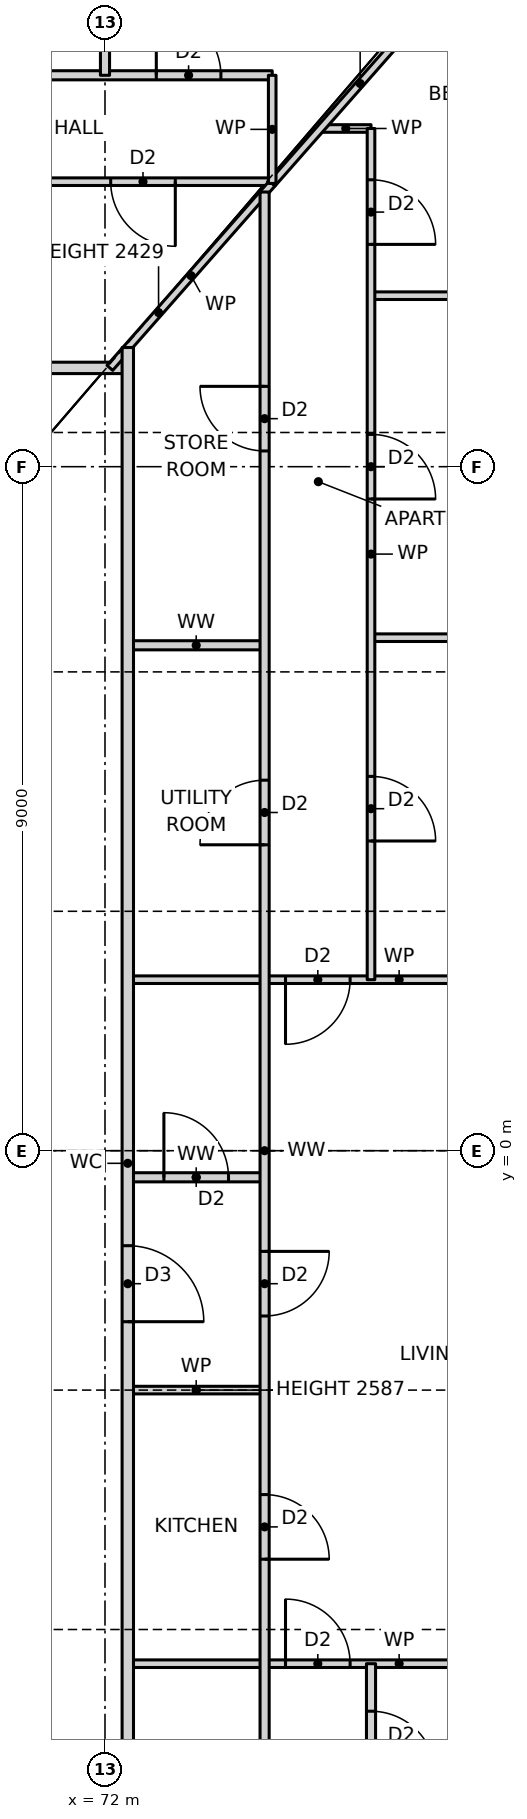
"""IFC4 building model, lengths in metres.
Left out: names, types, materials, properties, quantities, classifications, styles, units other than length and angle.
Written with IfcOpenShell. Run it as: python <this file> out.ifc"""

import sys

from ifc_helpers import new_model, si_unit, direction, frame, frame_2d, origin, place, context, subcontext, project, spatial, rectangle, extrude, element, fill, save


model = new_model("IFC4")
c1 = context("Model", 3, precision=1e-05, world=origin(), true_north=direction((0.0, 1.0)))
c2 = subcontext(c1, "Body", "Model", "MODEL_VIEW")
j1 = project(units=[si_unit("LENGTHUNIT", "METRE"), si_unit("PLANEANGLEUNIT", "RADIAN")], contexts=[c1])
p1 = place(None, origin())
s1 = spatial("IfcSite", under=j1, at=p1, CompositionType="ELEMENT")
p2 = place(p1, origin())
s2 = spatial("IfcBuilding", under=s1, at=p2, CompositionType="ELEMENT")
p3 = place(p2, frame((0.0, 0.0, 22.0)))
s3 = spatial("IfcBuildingStorey", under=s2, at=p3, CompositionType="ELEMENT", Elevation=22.0)
p4 = place(p3, frame((72.3, -6.75, 0.0), z_axis=(0.0, 0.0, 1.0), x_axis=(1.0, 0.0, 0.0)))
e1 = element("IfcWall", 1, at=p4, inside=s3, PredefinedType="PARTITIONING", context=c2, shape_type="SweptSolid", body=[
    extrude(rectangle(XDim=7.14, YDim=0.1, at=frame_2d((3.57, 0.0))), origin(), (0.0, 0.0, 1.0), 3.27),
])
p5 = place(p4, frame((2.075, 0.0, 0.0)))
e2 = element("IfcOpeningElement", 2, at=p5, cuts=e1, PredefinedType="OPENING", context=c2, shape_type="SweptSolid", body=[
    extrude(rectangle(XDim=0.85, YDim=2.1, at=frame_2d((0.425, 1.05))), frame((0.0, 0.06, 0.0), z_axis=(0.0, -1.0, 0.0), x_axis=(1.0, 0.0, 0.0)), (0.0, 0.0, 1.0), 0.12),
])
p6 = place(p3, frame((72.3, -3.15, 0.0), z_axis=(0.0, 0.0, 1.0), x_axis=(1.0, 0.0, 0.0)))
e3 = element("IfcWall", 3, at=p6, inside=s3, PredefinedType="PARTITIONING", context=c2, shape_type="SweptSolid", body=[
    extrude(rectangle(XDim=1.8, YDim=0.1, at=frame_2d((0.9, 0.0))), origin(), (0.0, 0.0, 1.0), 2.587),
])
p7 = place(p3, frame((72.3, -0.35, 0.0), z_axis=(0.0, 0.0, 1.0), x_axis=(1.0, 0.0, 0.0)))
e4 = element("IfcWall", 4, at=p7, inside=s3, PredefinedType="PARTITIONING", context=c2, shape_type="SweptSolid", body=[
    extrude(rectangle(XDim=1.8, YDim=0.12, at=frame_2d((0.9, 0.0))), origin(), (0.0, 0.0, 1.0), 3.27),
])
p8 = place(p7, frame((0.475, 0.0, 0.0)))
e5 = element("IfcOpeningElement", 5, at=p8, cuts=e4, PredefinedType="OPENING", context=c2, shape_type="SweptSolid", body=[
    extrude(rectangle(XDim=0.85, YDim=2.1, at=frame_2d((0.425, 1.05))), frame((0.0, 0.07, 0.0), z_axis=(0.0, -1.0, 0.0), x_axis=(1.0, 0.0, 0.0)), (0.0, 0.0, 1.0), 0.14),
])
p9 = place(p3, frame((72.3, 2.25, 0.0), z_axis=(0.0, 0.0, 1.0), x_axis=(1.0, 0.0, 0.0)))
e6 = element("IfcWall", 6, at=p9, inside=s3, PredefinedType="PARTITIONING", context=c2, shape_type="SweptSolid", body=[
    extrude(rectangle(XDim=7.14, YDim=0.1, at=frame_2d((3.57, 0.0))), origin(), (0.0, 0.0, 1.0), 3.27),
])
p10 = place(p9, frame((2.075, 0.0, 0.0)))
e7 = element("IfcOpeningElement", 7, at=p10, cuts=e6, PredefinedType="OPENING", context=c2, shape_type="SweptSolid", body=[
    extrude(rectangle(XDim=0.85, YDim=2.1, at=frame_2d((0.425, 1.05))), frame((0.0, 0.06, 0.0), z_axis=(0.0, -1.0, 0.0), x_axis=(1.0, 0.0, 0.0)), (0.0, 0.0, 1.0), 0.12),
])
p11 = place(p3, frame((72.3, 6.65, 0.0), z_axis=(0.0, 0.0, 1.0), x_axis=(1.0, 0.0, 0.0)))
e8 = element("IfcWall", 8, at=p11, inside=s3, PredefinedType="PARTITIONING", context=c2, shape_type="SweptSolid", body=[
    extrude(rectangle(XDim=1.8, YDim=0.12, at=frame_2d((0.9, 0.0))), origin(), (0.0, 0.0, 1.0), 3.27),
])
p12 = place(p3, frame((75.5, 6.75, 0.0), z_axis=(0.0, 0.0, 1.0), x_axis=(1.0, 0.0, 0.0)))
e9 = element("IfcWall", 9, at=p12, inside=s3, PredefinedType="PARTITIONING", context=c2, shape_type="SweptSolid", body=[
    extrude(rectangle(XDim=3.94, YDim=0.1, at=frame_2d((1.97, 0.0))), origin(), (0.0, 0.0, 1.0), 3.27),
])
p13 = place(p3, frame((53.7, 10.3, 0.0), z_axis=(0.0, 0.0, 1.0), x_axis=(1.0, 0.0, 0.0)))
e10 = element("IfcWall", 10, at=p13, inside=s3, PredefinedType="PARTITIONING", context=c2, shape_type="SweptSolid", body=[
    extrude(rectangle(XDim=18.6, YDim=0.15, at=frame_2d((9.3, 0.0))), origin(), (0.0, 0.0, 1.0), 3.27),
])
p14 = place(p13, frame((8.3, 0.0, 0.0)))
e11 = element("IfcOpeningElement", 11, at=p14, cuts=e10, PredefinedType="OPENING", context=c2, shape_type="SweptSolid", body=[
    extrude(rectangle(XDim=1.0, YDim=2.1, at=frame_2d((0.5, 1.05))), frame((0.0, 0.085, 0.0), z_axis=(0.0, -1.0, 0.0), x_axis=(1.0, 0.0, 0.0)), (0.0, 0.0, 1.0), 0.17),
])
p15 = place(p3, frame((75.5, 11.25, 0.0), z_axis=(0.0, 0.0, 1.0), x_axis=(1.0, 0.0, 0.0)))
e12 = element("IfcWall", 12, at=p15, inside=s3, PredefinedType="PARTITIONING", context=c2, shape_type="SweptSolid", body=[
    extrude(rectangle(XDim=3.94, YDim=0.1, at=frame_2d((1.97, 0.0))), origin(), (0.0, 0.0, 1.0), 3.27),
])
p16 = place(p3, frame((51.8, 12.75, 0.0), z_axis=(0.0, 0.0, 1.0), x_axis=(1.0, 0.0, 0.0)))
e13 = element("IfcWall", 13, at=p16, inside=s3, PredefinedType="PARTITIONING", context=c2, shape_type="SweptSolid", body=[
    extrude(rectangle(XDim=22.4, YDim=0.1, at=frame_2d((11.2, 0.0))), origin(), (0.0, 0.0, 1.0), 3.27),
])
p17 = place(p16, frame((13.475, 0.0, 0.0)))
e14 = element("IfcOpeningElement", 14, at=p17, cuts=e13, PredefinedType="OPENING", context=c2, shape_type="SweptSolid", body=[
    extrude(rectangle(XDim=0.85, YDim=2.1, at=frame_2d((0.425, 1.05))), frame((0.0, 0.06, 0.0), z_axis=(0.0, -1.0, 0.0), x_axis=(1.0, 0.0, 0.0)), (0.0, 0.0, 1.0), 0.12),
])
p18 = place(p16, frame((10.275, 0.0, 0.0)))
e15 = element("IfcOpeningElement", 15, at=p18, cuts=e13, PredefinedType="OPENING", context=c2, shape_type="SweptSolid", body=[
    extrude(rectangle(XDim=0.85, YDim=2.1, at=frame_2d((0.425, 1.05))), frame((0.0, 0.06, 0.0), z_axis=(0.0, -1.0, 0.0), x_axis=(1.0, 0.0, 0.0)), (0.0, 0.0, 1.0), 0.12),
])
p19 = place(p16, frame((16.925, 0.0, 0.0)))
e16 = element("IfcOpeningElement", 16, at=p19, cuts=e13, PredefinedType="OPENING", context=c2, shape_type="SweptSolid", body=[
    extrude(rectangle(XDim=0.85, YDim=2.1, at=frame_2d((0.425, 1.05))), frame((0.0, 0.06, 0.0), z_axis=(0.0, -1.0, 0.0), x_axis=(1.0, 0.0, 0.0)), (0.0, 0.0, 1.0), 0.12),
])
p20 = place(p16, frame((20.275, 0.0, 0.0)))
e17 = element("IfcOpeningElement", 17, at=p20, cuts=e13, PredefinedType="OPENING", context=c2, shape_type="SweptSolid", body=[
    extrude(rectangle(XDim=0.85, YDim=2.1, at=frame_2d((0.425, 1.05))), frame((0.0, 0.06, 0.0), z_axis=(0.0, -1.0, 0.0), x_axis=(1.0, 0.0, 0.0)), (0.0, 0.0, 1.0), 0.12),
])
p21 = place(p16, frame((4.625, 0.0, 0.0)))
e18 = element("IfcOpeningElement", 18, at=p21, cuts=e13, PredefinedType="OPENING", context=c2, shape_type="SweptSolid", body=[
    extrude(rectangle(XDim=0.85, YDim=2.1, at=frame_2d((0.425, 1.05))), frame((0.0, 0.06, 0.0), z_axis=(0.0, -1.0, 0.0), x_axis=(1.0, 0.0, 0.0)), (0.0, 0.0, 1.0), 0.12),
])
p22 = place(p16, frame((1.275, 0.0, 0.0)))
e19 = element("IfcOpeningElement", 19, at=p22, cuts=e13, PredefinedType="OPENING", context=c2, shape_type="SweptSolid", body=[
    extrude(rectangle(XDim=0.85, YDim=2.1, at=frame_2d((0.425, 1.05))), frame((0.0, 0.06, 0.0), z_axis=(0.0, -1.0, 0.0), x_axis=(1.0, 0.0, 0.0)), (0.0, 0.0, 1.0), 0.12),
])
p23 = place(p3, frame((74.836, 13.45, 0.0), z_axis=(0.0, 0.0, 1.0), x_axis=(1.0, 0.0, 0.0)))
e20 = element("IfcWall", 20, at=p23, inside=s3, PredefinedType="PARTITIONING", context=c2, shape_type="SweptSolid", body=[
    extrude(rectangle(XDim=0.664, YDim=0.1, at=frame_2d((0.332, 0.0))), origin(), (0.0, 0.0, 1.0), 3.27),
])
p24 = place(p3, frame((67.5, 14.15, 0.0), z_axis=(0.0, 0.0, 1.0), x_axis=(1.0, 0.0, 0.0)))
e21 = element("IfcWall", 21, at=p24, inside=s3, PredefinedType="PARTITIONING", context=c2, shape_type="SweptSolid", body=[
    extrude(rectangle(XDim=6.7, YDim=0.12, at=frame_2d((3.35, 0.0))), origin(), (0.0, 0.0, 1.0), 3.27),
])
p25 = place(p24, frame((0.625, 0.0, 0.0)))
e22 = element("IfcOpeningElement", 22, at=p25, cuts=e21, PredefinedType="OPENING", context=c2, shape_type="SweptSolid", body=[
    extrude(rectangle(XDim=0.85, YDim=2.1, at=frame_2d((0.425, 1.05))), frame((0.0, 0.07, 0.0), z_axis=(0.0, -1.0, 0.0), x_axis=(1.0, 0.0, 0.0)), (0.0, 0.0, 1.0), 0.14),
])
p26 = place(p24, frame((5.175, 0.0, 0.0)))
e23 = element("IfcOpeningElement", 23, at=p26, cuts=e21, PredefinedType="OPENING", context=c2, shape_type="SweptSolid", body=[
    extrude(rectangle(XDim=0.85, YDim=2.1, at=frame_2d((0.425, 1.05))), frame((0.0, 0.07, 0.0), z_axis=(0.0, -1.0, 0.0), x_axis=(1.0, 0.0, 0.0)), (0.0, 0.0, 1.0), 0.14),
])
p27 = place(p3, frame((72.064, 10.3, 0.0), z_axis=(0.0, 0.0, 1.0), x_axis=(0.660667046586, 0.75067906162, 0.0)))
e24 = element("IfcWall", 24, at=p27, inside=s3, PredefinedType="PARTITIONING", context=c2, shape_type="SweptSolid", body=[
    extrude(rectangle(XDim=3.233, YDim=0.1, at=frame_2d((1.617, 0.0))), origin(), (0.0, 0.0, 1.0), 2.429),
])
p28 = place(p3, frame((74.2, 12.727, 0.0), z_axis=(0.0, 0.0, 1.0), x_axis=(0.660698595885, 0.750651294141, 0.0)))
e25 = element("IfcWall", 25, at=p28, inside=s3, PredefinedType="PARTITIONING", context=c2, shape_type="SweptSolid", body=[
    extrude(rectangle(XDim=5.838, YDim=0.1, at=frame_2d((2.919, 0.0))), origin(), (0.0, 0.0, 1.0), 2.429),
])
p29 = place(p3, frame((75.5, -13.45, 0.0), z_axis=(0.0, 0.0, 1.0), x_axis=(0.0, 1.0, 0.0)))
e26 = element("IfcWall", 26, at=p29, inside=s3, PredefinedType="PARTITIONING", context=c2, shape_type="SweptSolid", body=[
    extrude(rectangle(XDim=6.7, YDim=0.12, at=frame_2d((3.35, 0.0))), origin(), (0.0, 0.0, 1.0), 3.27),
])
p30 = place(p29, frame((5.225, 0.0, 0.0)))
e27 = element("IfcOpeningElement", 27, at=p30, cuts=e26, PredefinedType="OPENING", context=c2, shape_type="SweptSolid", body=[
    extrude(rectangle(XDim=0.85, YDim=2.1, at=frame_2d((0.425, 1.05))), frame((0.0, 0.07, 0.0), z_axis=(0.0, -1.0, 0.0), x_axis=(1.0, 0.0, 0.0)), (0.0, 0.0, 1.0), 0.14),
])
p31 = place(p29, frame((0.675, 0.0, 0.0)))
e28 = element("IfcOpeningElement", 28, at=p31, cuts=e26, PredefinedType="OPENING", context=c2, shape_type="SweptSolid", body=[
    extrude(rectangle(XDim=0.85, YDim=2.1, at=frame_2d((0.425, 1.05))), frame((0.0, 0.07, 0.0), z_axis=(0.0, -1.0, 0.0), x_axis=(1.0, 0.0, 0.0)), (0.0, 0.0, 1.0), 0.14),
])
p32 = place(p3, frame((75.5, 2.25, 0.0), z_axis=(0.0, 0.0, 1.0), x_axis=(0.0, 1.0, 0.0)))
e29 = element("IfcWall", 29, at=p32, inside=s3, PredefinedType="PARTITIONING", context=c2, shape_type="SweptSolid", body=[
    extrude(rectangle(XDim=11.2, YDim=0.1, at=frame_2d((5.6, 0.0))), origin(), (0.0, 0.0, 1.0), 3.27),
])
p33 = place(p32, frame((1.825, 0.0, 0.0)))
e30 = element("IfcOpeningElement", 30, at=p33, cuts=e29, PredefinedType="OPENING", context=c2, shape_type="SweptSolid", body=[
    extrude(rectangle(XDim=0.85, YDim=2.1, at=frame_2d((0.425, 1.05))), frame((0.0, 0.06, 0.0), z_axis=(0.0, -1.0, 0.0), x_axis=(1.0, 0.0, 0.0)), (0.0, 0.0, 1.0), 0.12),
])
p34 = place(p32, frame((6.325, 0.0, 0.0)))
e31 = element("IfcOpeningElement", 31, at=p34, cuts=e29, PredefinedType="OPENING", context=c2, shape_type="SweptSolid", body=[
    extrude(rectangle(XDim=0.85, YDim=2.1, at=frame_2d((0.425, 1.05))), frame((0.0, 0.06, 0.0), z_axis=(0.0, -1.0, 0.0), x_axis=(1.0, 0.0, 0.0)), (0.0, 0.0, 1.0), 0.12),
])
p35 = place(p32, frame((9.675, 0.0, 0.0)))
e32 = element("IfcOpeningElement", 32, at=p35, cuts=e29, PredefinedType="OPENING", context=c2, shape_type="SweptSolid", body=[
    extrude(rectangle(XDim=0.85, YDim=2.1, at=frame_2d((0.425, 1.05))), frame((0.0, 0.06, 0.0), z_axis=(0.0, -1.0, 0.0), x_axis=(1.0, 0.0, 0.0)), (0.0, 0.0, 1.0), 0.12),
])
p36 = place(p3, frame((74.2, 12.727, 0.0), z_axis=(0.0, 0.0, 1.0), x_axis=(0.0, 1.0, 0.0)))
e33 = element("IfcWall", 33, at=p36, inside=s3, PredefinedType="PARTITIONING", context=c2, shape_type="SweptSolid", body=[
    extrude(rectangle(XDim=1.423, YDim=0.1, at=frame_2d((0.711, 0.0))), origin(), (0.0, 0.0, 1.0), 3.27),
])
p37 = place(p3, frame((74.1, -12.614, 0.0), z_axis=(0.0, 0.0, 1.0), x_axis=(0.0, 1.0, 0.0)))
e34 = element("IfcWall", 34, at=p37, inside=s3, PredefinedType="PARTITIONING", context=c2, shape_type="SweptSolid", body=[
    extrude(rectangle(XDim=25.228, YDim=0.12, at=frame_2d((12.614, 0.0))), origin(), (0.0, 0.0, 1.0), 3.27),
])
p38 = place(p37, frame((7.239, 0.0, 0.0)))
e35 = element("IfcOpeningElement", 35, at=p38, cuts=e34, PredefinedType="OPENING", context=c2, shape_type="SweptSolid", body=[
    extrude(rectangle(XDim=0.85, YDim=2.1, at=frame_2d((0.425, 1.05))), frame((0.0, 0.07, 0.0), z_axis=(0.0, -1.0, 0.0), x_axis=(1.0, 0.0, 0.0)), (0.0, 0.0, 1.0), 0.14),
])
p39 = place(p37, frame((10.439, 0.0, 0.0)))
e36 = element("IfcOpeningElement", 36, at=p39, cuts=e34, PredefinedType="OPENING", context=c2, shape_type="SweptSolid", body=[
    extrude(rectangle(XDim=0.85, YDim=2.1, at=frame_2d((0.425, 1.05))), frame((0.0, 0.07, 0.0), z_axis=(0.0, -1.0, 0.0), x_axis=(1.0, 0.0, 0.0)), (0.0, 0.0, 1.0), 0.14),
])
p40 = place(p37, frame((2.507, 0.0, 0.0)))
e37 = element("IfcOpeningElement", 37, at=p40, cuts=e34, PredefinedType="OPENING", context=c2, shape_type="SweptSolid", body=[
    extrude(rectangle(XDim=0.85, YDim=2.1, at=frame_2d((0.425, 1.05))), frame((0.0, 0.07, 0.0), z_axis=(0.0, -1.0, 0.0), x_axis=(1.0, 0.0, 0.0)), (0.0, 0.0, 1.0), 0.14),
])
p41 = place(p37, frame((16.639, 0.0, 0.0)))
e38 = element("IfcOpeningElement", 38, at=p41, cuts=e34, PredefinedType="OPENING", context=c2, shape_type="SweptSolid", body=[
    extrude(rectangle(XDim=0.85, YDim=2.1, at=frame_2d((0.425, 1.05))), frame((0.0, 0.07, 0.0), z_axis=(0.0, -1.0, 0.0), x_axis=(1.0, 0.0, 0.0)), (0.0, 0.0, 1.0), 0.14),
])
p42 = place(p37, frame((21.821, 0.0, 0.0)))
e39 = element("IfcOpeningElement", 39, at=p42, cuts=e34, PredefinedType="OPENING", context=c2, shape_type="SweptSolid", body=[
    extrude(rectangle(XDim=0.85, YDim=2.1, at=frame_2d((0.425, 1.05))), frame((0.0, 0.07, 0.0), z_axis=(0.0, -1.0, 0.0), x_axis=(1.0, 0.0, 0.0)), (0.0, 0.0, 1.0), 0.14),
])
p43 = place(p3, frame((72.3, -10.9, 0.0), z_axis=(0.0, 0.0, 1.0), x_axis=(0.0, 1.0, 0.0)))
e40 = element("IfcWall", 40, at=p43, inside=s3, PredefinedType="PARTITIONING", context=c2, shape_type="SweptSolid", body=[
    extrude(rectangle(XDim=21.468, YDim=0.15, at=frame_2d((10.734, 0.0))), origin(), (0.0, 0.0, 1.0), 3.27),
])
p44 = place(p43, frame((8.65, 0.0, 0.0)))
e41 = element("IfcOpeningElement", 41, at=p44, cuts=e40, PredefinedType="OPENING", context=c2, shape_type="SweptSolid", body=[
    extrude(rectangle(XDim=1.0, YDim=2.1, at=frame_2d((0.5, 1.05))), frame((0.0, 0.085, 0.0), z_axis=(0.0, -1.0, 0.0), x_axis=(1.0, 0.0, 0.0)), (0.0, 0.0, 1.0), 0.17),
])
p45 = place(p3, frame((72.0, 14.15, 0.0), z_axis=(0.0, 0.0, 1.0), x_axis=(0.0, 1.0, 0.0)))
e42 = element("IfcWall", 42, at=p45, inside=s3, PredefinedType="PARTITIONING", context=c2, shape_type="SweptSolid", body=[
    extrude(rectangle(XDim=4.54, YDim=0.12, at=frame_2d((2.27, 0.0))), origin(), (0.0, 0.0, 1.0), 3.27),
])
p46 = place(p38, frame((0.85, 0.0, 0.0), z_axis=(0.0, 0.0, 1.0), x_axis=(-1.0, 0.0, 0.0)))
e43 = element("IfcDoor", 43, at=p46, inside=s3, OperationType="SINGLE_SWING_RIGHT", PredefinedType="DOOR", context=c2, shape_type="SweptSolid", body=[
    extrude(rectangle(XDim=0.85, YDim=2.1, at=frame_2d((0.425, 1.05))), frame((0.0, 0.025, 0.0), z_axis=(0.0, -1.0, 0.0), x_axis=(1.0, 0.0, 0.0)), (0.0, 0.0, 1.0), 0.05),
])
fill(e35, e43)
p47 = place(p44, frame((1.0, 0.0, 0.0), z_axis=(0.0, 0.0, 1.0), x_axis=(-1.0, 0.0, 0.0)))
e44 = element("IfcDoor", 44, at=p47, inside=s3, OperationType="SINGLE_SWING_RIGHT", PredefinedType="DOOR", context=c2, shape_type="SweptSolid", body=[
    extrude(rectangle(XDim=1.0, YDim=2.1, at=frame_2d((0.5, 1.05))), frame((0.0, 0.025, 0.0), z_axis=(0.0, -1.0, 0.0), x_axis=(1.0, 0.0, 0.0)), (0.0, 0.0, 1.0), 0.05),
])
fill(e41, e44)
p48 = place(p39, frame((0.85, 0.0, 0.0), z_axis=(0.0, 0.0, 1.0), x_axis=(-1.0, 0.0, 0.0)))
e45 = element("IfcDoor", 45, at=p48, inside=s3, OperationType="SINGLE_SWING_LEFT", PredefinedType="DOOR", context=c2, shape_type="SweptSolid", body=[
    extrude(rectangle(XDim=0.85, YDim=2.1, at=frame_2d((0.425, 1.05))), frame((0.0, 0.025, 0.0), z_axis=(0.0, -1.0, 0.0), x_axis=(1.0, 0.0, 0.0)), (0.0, 0.0, 1.0), 0.05),
])
fill(e36, e45)
p49 = place(p8, origin())
e46 = element("IfcDoor", 46, at=p49, inside=s3, OperationType="SINGLE_SWING_LEFT", PredefinedType="DOOR", context=c2, shape_type="SweptSolid", body=[
    extrude(rectangle(XDim=0.85, YDim=2.1, at=frame_2d((0.425, 1.05))), frame((0.0, 0.025, 0.0), z_axis=(0.0, -1.0, 0.0), x_axis=(1.0, 0.0, 0.0)), (0.0, 0.0, 1.0), 0.05),
])
fill(e5, e46)
p50 = place(p5, origin())
e47 = element("IfcDoor", 47, at=p50, inside=s3, OperationType="SINGLE_SWING_LEFT", PredefinedType="DOOR", context=c2, shape_type="SweptSolid", body=[
    extrude(rectangle(XDim=0.85, YDim=2.1, at=frame_2d((0.425, 1.05))), frame((0.0, 0.025, 0.0), z_axis=(0.0, -1.0, 0.0), x_axis=(1.0, 0.0, 0.0)), (0.0, 0.0, 1.0), 0.05),
])
fill(e2, e47)
p51 = place(p30, frame((0.85, 0.0, 0.0), z_axis=(0.0, 0.0, 1.0), x_axis=(-1.0, 0.0, 0.0)))
e48 = element("IfcDoor", 48, at=p51, inside=s3, OperationType="SINGLE_SWING_RIGHT", PredefinedType="DOOR", context=c2, shape_type="SweptSolid", body=[
    extrude(rectangle(XDim=0.85, YDim=2.1, at=frame_2d((0.425, 1.05))), frame((0.0, 0.025, 0.0), z_axis=(0.0, -1.0, 0.0), x_axis=(1.0, 0.0, 0.0)), (0.0, 0.0, 1.0), 0.05),
])
fill(e27, e48)
p52 = place(p10, frame((0.85, 0.0, 0.0), z_axis=(0.0, 0.0, 1.0), x_axis=(-1.0, 0.0, 0.0)))
e49 = element("IfcDoor", 49, at=p52, inside=s3, OperationType="SINGLE_SWING_RIGHT", PredefinedType="DOOR", context=c2, shape_type="SweptSolid", body=[
    extrude(rectangle(XDim=0.85, YDim=2.1, at=frame_2d((0.425, 1.05))), frame((0.0, 0.025, 0.0), z_axis=(0.0, -1.0, 0.0), x_axis=(1.0, 0.0, 0.0)), (0.0, 0.0, 1.0), 0.05),
])
fill(e7, e49)
p53 = place(p33, frame((0.85, 0.0, 0.0), z_axis=(0.0, 0.0, 1.0), x_axis=(-1.0, 0.0, 0.0)))
e50 = element("IfcDoor", 50, at=p53, inside=s3, OperationType="SINGLE_SWING_RIGHT", PredefinedType="DOOR", context=c2, shape_type="SweptSolid", body=[
    extrude(rectangle(XDim=0.85, YDim=2.1, at=frame_2d((0.425, 1.05))), frame((0.0, 0.025, 0.0), z_axis=(0.0, -1.0, 0.0), x_axis=(1.0, 0.0, 0.0)), (0.0, 0.0, 1.0), 0.05),
])
fill(e30, e50)
p54 = place(p34, frame((0.85, 0.0, 0.0), z_axis=(0.0, 0.0, 1.0), x_axis=(-1.0, 0.0, 0.0)))
e51 = element("IfcDoor", 51, at=p54, inside=s3, OperationType="SINGLE_SWING_RIGHT", PredefinedType="DOOR", context=c2, shape_type="SweptSolid", body=[
    extrude(rectangle(XDim=0.85, YDim=2.1, at=frame_2d((0.425, 1.05))), frame((0.0, 0.025, 0.0), z_axis=(0.0, -1.0, 0.0), x_axis=(1.0, 0.0, 0.0)), (0.0, 0.0, 1.0), 0.05),
])
fill(e31, e51)
p55 = place(p35, frame((0.85, 0.0, 0.0), z_axis=(0.0, 0.0, 1.0), x_axis=(-1.0, 0.0, 0.0)))
e52 = element("IfcDoor", 52, at=p55, inside=s3, OperationType="SINGLE_SWING_RIGHT", PredefinedType="DOOR", context=c2, shape_type="SweptSolid", body=[
    extrude(rectangle(XDim=0.85, YDim=2.1, at=frame_2d((0.425, 1.05))), frame((0.0, 0.025, 0.0), z_axis=(0.0, -1.0, 0.0), x_axis=(1.0, 0.0, 0.0)), (0.0, 0.0, 1.0), 0.05),
])
fill(e32, e52)
p56 = place(p41, origin())
e53 = element("IfcDoor", 53, at=p56, inside=s3, OperationType="SINGLE_SWING_LEFT", PredefinedType="DOOR", context=c2, shape_type="SweptSolid", body=[
    extrude(rectangle(XDim=0.85, YDim=2.1, at=frame_2d((0.425, 1.05))), frame((0.0, 0.025, 0.0), z_axis=(0.0, -1.0, 0.0), x_axis=(1.0, 0.0, 0.0)), (0.0, 0.0, 1.0), 0.05),
])
fill(e38, e53)
p57 = place(p42, origin())
e54 = element("IfcDoor", 54, at=p57, inside=s3, OperationType="SINGLE_SWING_RIGHT", PredefinedType="DOOR", context=c2, shape_type="SweptSolid", body=[
    extrude(rectangle(XDim=0.85, YDim=2.1, at=frame_2d((0.425, 1.05))), frame((0.0, 0.025, 0.0), z_axis=(0.0, -1.0, 0.0), x_axis=(1.0, 0.0, 0.0)), (0.0, 0.0, 1.0), 0.05),
])
fill(e39, e54)
p58 = place(p26, origin())
e55 = element("IfcDoor", 55, at=p58, inside=s3, OperationType="SINGLE_SWING_LEFT", PredefinedType="DOOR", context=c2, shape_type="SweptSolid", body=[
    extrude(rectangle(XDim=0.85, YDim=2.1, at=frame_2d((0.425, 1.05))), frame((0.0, 0.025, 0.0), z_axis=(0.0, -1.0, 0.0), x_axis=(1.0, 0.0, 0.0)), (0.0, 0.0, 1.0), 0.05),
])
fill(e23, e55)
p59 = place(p20, frame((0.85, 0.0, 0.0), z_axis=(0.0, 0.0, 1.0), x_axis=(-1.0, 0.0, 0.0)))
e56 = element("IfcDoor", 56, at=p59, inside=s3, OperationType="SINGLE_SWING_LEFT", PredefinedType="DOOR", context=c2, shape_type="SweptSolid", body=[
    extrude(rectangle(XDim=0.85, YDim=2.1, at=frame_2d((0.425, 1.05))), frame((0.0, 0.025, 0.0), z_axis=(0.0, -1.0, 0.0), x_axis=(1.0, 0.0, 0.0)), (0.0, 0.0, 1.0), 0.05),
])
fill(e17, e56)
save(model, sys.argv[1])
